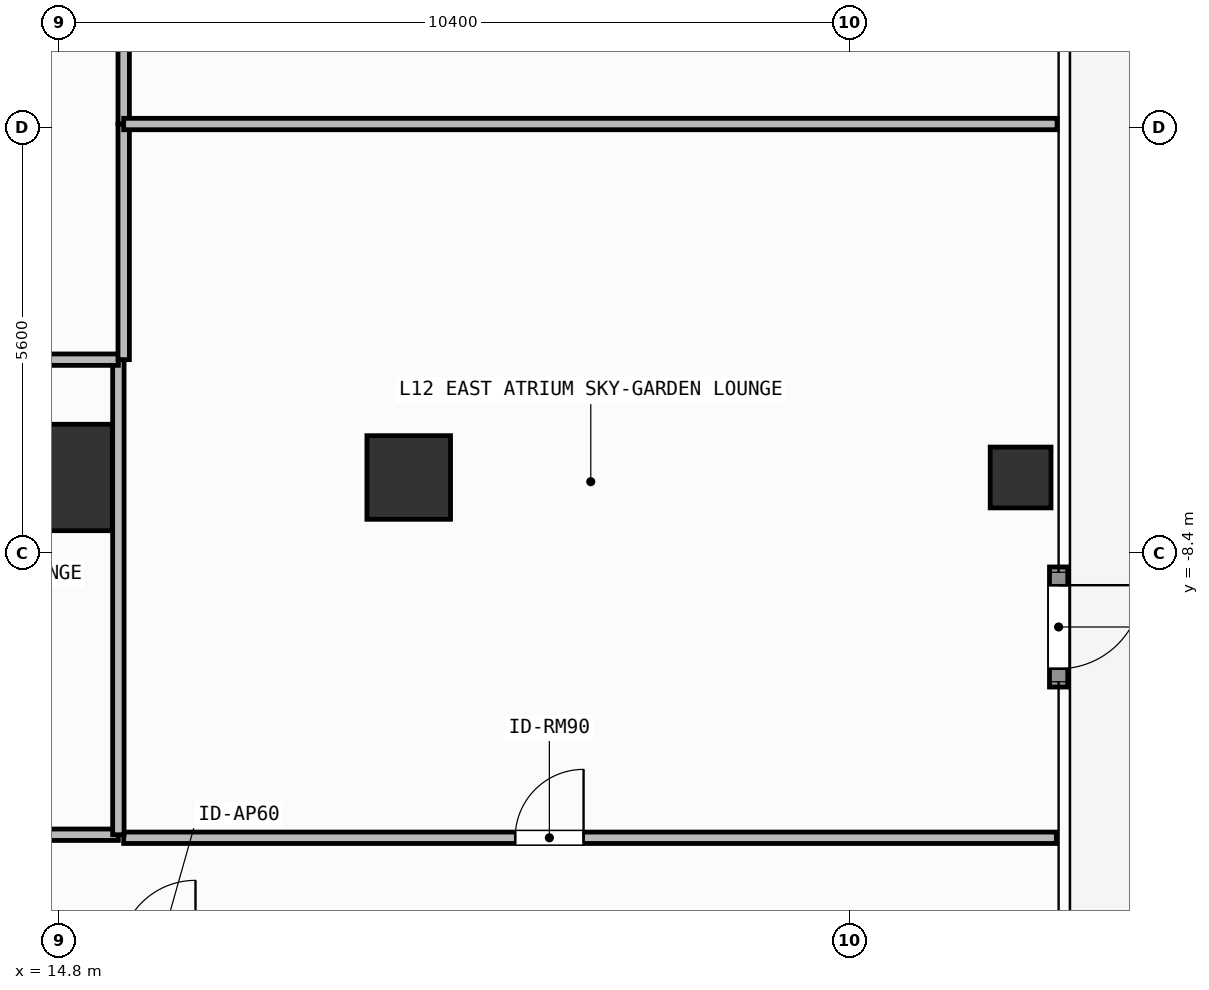
"""IFC4 building model, lengths in metres.
Left out: names, types, materials, properties, quantities, classifications, styles, units other than length and angle.
Written with IfcOpenShell. Run it as: python <this file> out.ifc"""

import sys

from ifc_helpers import new_model, si_unit, direction, frame, frame_2d, origin, origin_2d, place, context, subcontext, project, spatial, rectangle, hollow_rectangle, extrude, element, fill, save


model = new_model("IFC4")
c1 = context("Model", 3, precision=1e-05, world=origin(), true_north=direction((0.0, 1.0)))
c2 = subcontext(c1, "Body", "Model", "MODEL_VIEW")
j1 = project(units=[si_unit("LENGTHUNIT", "METRE"), si_unit("PLANEANGLEUNIT", "RADIAN")], contexts=[c1])
p1 = place(None, origin())
s1 = spatial("IfcSite", under=j1, at=p1, CompositionType="ELEMENT")
p2 = place(p1, origin())
s2 = spatial("IfcBuilding", under=s1, at=p2, CompositionType="ELEMENT")
p3 = place(p2, frame((0.0, 0.0, 46.2)))
s3 = spatial("IfcBuildingStorey", under=s2, at=p3, CompositionType="ELEMENT", Elevation=46.2)
p4 = place(p3, frame((14.8, -7.4, 0.0), z_axis=(0.0, 0.0, 1.0), x_axis=(1.0, 0.0, 0.0)))
e1 = element("IfcColumn", 1, at=p4, inside=s3, PredefinedType="COLUMN", context=c2, shape_type="SweptSolid", body=[
    extrude(rectangle(XDim=1.4, YDim=1.4, at=origin_2d()), origin(), (0.0, 0.0, 1.0), 3.9),
])
p5 = place(p3, frame((19.4, -7.4, 0.0), z_axis=(0.0, 0.0, 1.0), x_axis=(1.0, 0.0, 0.0)))
e2 = element("IfcColumn", 2, at=p5, inside=s3, PredefinedType="COLUMN", context=c2, shape_type="SweptSolid", body=[
    extrude(rectangle(XDim=1.1, YDim=1.1, at=origin_2d()), origin(), (0.0, 0.0, 1.0), 3.9),
])
p6 = place(p3, frame((27.45, -7.4, 0.0), z_axis=(0.0, 0.0, 1.0), x_axis=(1.0, 0.0, 0.0)))
e3 = element("IfcColumn", 3, at=p6, inside=s3, PredefinedType="COLUMN", context=c2, shape_type="SweptSolid", body=[
    extrude(hollow_rectangle(XDim=0.8, YDim=0.8, WallThickness=0.036, at=origin_2d()), origin(), (0.0, 0.0, 1.0), 3.9),
])
p7 = place(p3, frame((27.95, -8.577, 0.0), z_axis=(0.0, 0.0, 1.0), x_axis=(0.0, -1.0, 0.0)))
e4 = element("IfcWall", 4, at=p7, inside=s3, PredefinedType="SOLIDWALL", context=c2, shape_type="SweptSolid", body=[
    extrude(rectangle(XDim=1.58, YDim=0.24, at=frame_2d((0.79, 0.0))), origin(), (0.0, 0.0, 1.0), 3.68),
])
p8 = place(p7, frame((0.24, 0.0, 0.0)))
e5 = element("IfcOpeningElement", 5, at=p8, cuts=e4, PredefinedType="OPENING", context=c2, shape_type="SweptSolid", body=[
    extrude(rectangle(XDim=1.1, YDim=2.2, at=frame_2d((0.55, 1.1))), frame((0.0, 0.13, 0.0), z_axis=(0.0, -1.0, 0.0), x_axis=(1.0, 0.0, 0.0)), (0.0, 0.0, 1.0), 0.26),
])
p9 = place(p3, frame((10.1, -12.1, 0.0), z_axis=(0.0, 0.0, 1.0), x_axis=(1.0, 0.0, 0.0)))
e6 = element("IfcWall", 6, at=p9, inside=s3, PredefinedType="PARTITIONING", context=c2, shape_type="SweptSolid", body=[
    extrude(rectangle(XDim=5.48, YDim=0.15, at=frame_2d((2.74, 0.0))), origin(), (0.0, 0.0, 1.0), 3.68),
])
p10 = place(p9, frame((2.29, 0.0, 0.0)))
e7 = element("IfcOpeningElement", 7, at=p10, cuts=e6, PredefinedType="OPENING", context=c2, shape_type="SweptSolid", body=[
    extrude(rectangle(XDim=0.9, YDim=2.1, at=frame_2d((0.45, 1.05))), frame((0.0, 0.085, 0.0), z_axis=(0.0, -1.0, 0.0), x_axis=(1.0, 0.0, 0.0)), (0.0, 0.0, 1.0), 0.17),
])
p11 = place(p3, frame((15.65, -12.14, 0.0), z_axis=(0.0, 0.0, 1.0), x_axis=(1.0, 0.0, 0.0)))
e8 = element("IfcWall", 8, at=p11, inside=s3, PredefinedType="PARTITIONING", context=c2, shape_type="SweptSolid", body=[
    extrude(rectangle(XDim=12.27, YDim=0.15, at=frame_2d((6.135, 0.0))), origin(), (0.0, 0.0, 1.0), 3.68),
])
p12 = place(p11, frame((5.15, 0.0, 0.0)))
e9 = element("IfcOpeningElement", 9, at=p12, cuts=e8, PredefinedType="OPENING", context=c2, shape_type="SweptSolid", body=[
    extrude(rectangle(XDim=0.9, YDim=2.1, at=frame_2d((0.45, 1.05))), frame((0.0, 0.085, 0.0), z_axis=(0.0, -1.0, 0.0), x_axis=(1.0, 0.0, 0.0)), (0.0, 0.0, 1.0), 0.17),
])
p13 = place(p3, frame((15.58, -12.1, 0.0), z_axis=(0.0, 0.0, 1.0), x_axis=(0.0, 1.0, 0.0)))
e10 = element("IfcWall", 10, at=p13, inside=s3, PredefinedType="PARTITIONING", context=c2, shape_type="SweptSolid", body=[
    extrude(rectangle(XDim=6.25, YDim=0.15, at=frame_2d((3.125, 0.0))), origin(), (0.0, 0.0, 1.0), 3.68),
])
p14 = place(p3, frame((8.96, -5.85, 0.0), z_axis=(0.0, 0.0, 1.0), x_axis=(1.0, 0.0, 0.0)))
e11 = element("IfcWall", 11, at=p14, inside=s3, PredefinedType="PARTITIONING", context=c2, shape_type="SweptSolid", body=[
    extrude(rectangle(XDim=6.62, YDim=0.15, at=frame_2d((3.31, 0.0))), origin(), (0.0, 0.0, 1.0), 3.68),
])
p15 = place(p3, frame((15.65, -5.85, 0.0), z_axis=(0.0, 0.0, 1.0), x_axis=(0.0, 1.0, 0.0)))
e12 = element("IfcWall", 12, at=p15, inside=s3, PredefinedType="PARTITIONING", context=c2, shape_type="SweptSolid", body=[
    extrude(rectangle(XDim=3.1, YDim=0.15, at=frame_2d((1.55, 0.0))), origin(), (0.0, 0.0, 1.0), 3.68),
])
p16 = place(p3, frame((15.65, -2.75, 0.0), z_axis=(0.0, 0.0, 1.0), x_axis=(0.0, 1.0, 0.0)))
e13 = element("IfcWall", 13, at=p16, inside=s3, PredefinedType="PARTITIONING", context=c2, shape_type="SweptSolid", body=[
    extrude(rectangle(XDim=8.6, YDim=0.15, at=frame_2d((4.3, 0.0))), origin(), (0.0, 0.0, 1.0), 3.68),
])
p17 = place(p3, frame((15.65, -2.75, 0.0), z_axis=(0.0, 0.0, 1.0), x_axis=(1.0, 0.0, 0.0)))
e14 = element("IfcWall", 14, at=p17, inside=s3, PredefinedType="PARTITIONING", context=c2, shape_type="SweptSolid", body=[
    extrude(rectangle(XDim=12.28, YDim=0.15, at=frame_2d((6.14, 0.0))), origin(), (0.0, 0.0, 1.0), 3.68),
])
p18 = place(p8, origin())
e15 = element("IfcDoor", 15, at=p18, inside=s3, OperationType="SINGLE_SWING_LEFT", PredefinedType="DOOR", context=c2, shape_type="SweptSolid", body=[
    extrude(rectangle(XDim=1.1, YDim=2.2, at=frame_2d((0.55, 1.1))), frame((0.0, 0.025, 0.0), z_axis=(0.0, -1.0, 0.0), x_axis=(1.0, 0.0, 0.0)), (0.0, 0.0, 1.0), 0.05),
])
fill(e5, e15)
p19 = place(p12, origin())
e16 = element("IfcDoor", 16, at=p19, inside=s3, OperationType="SINGLE_SWING_RIGHT", PredefinedType="DOOR", context=c2, shape_type="SweptSolid", body=[
    extrude(rectangle(XDim=0.9, YDim=2.1, at=frame_2d((0.45, 1.05))), frame((0.0, 0.025, 0.0), z_axis=(0.0, -1.0, 0.0), x_axis=(1.0, 0.0, 0.0)), (0.0, 0.0, 1.0), 0.05),
])
fill(e9, e16)
save(model, sys.argv[1])
